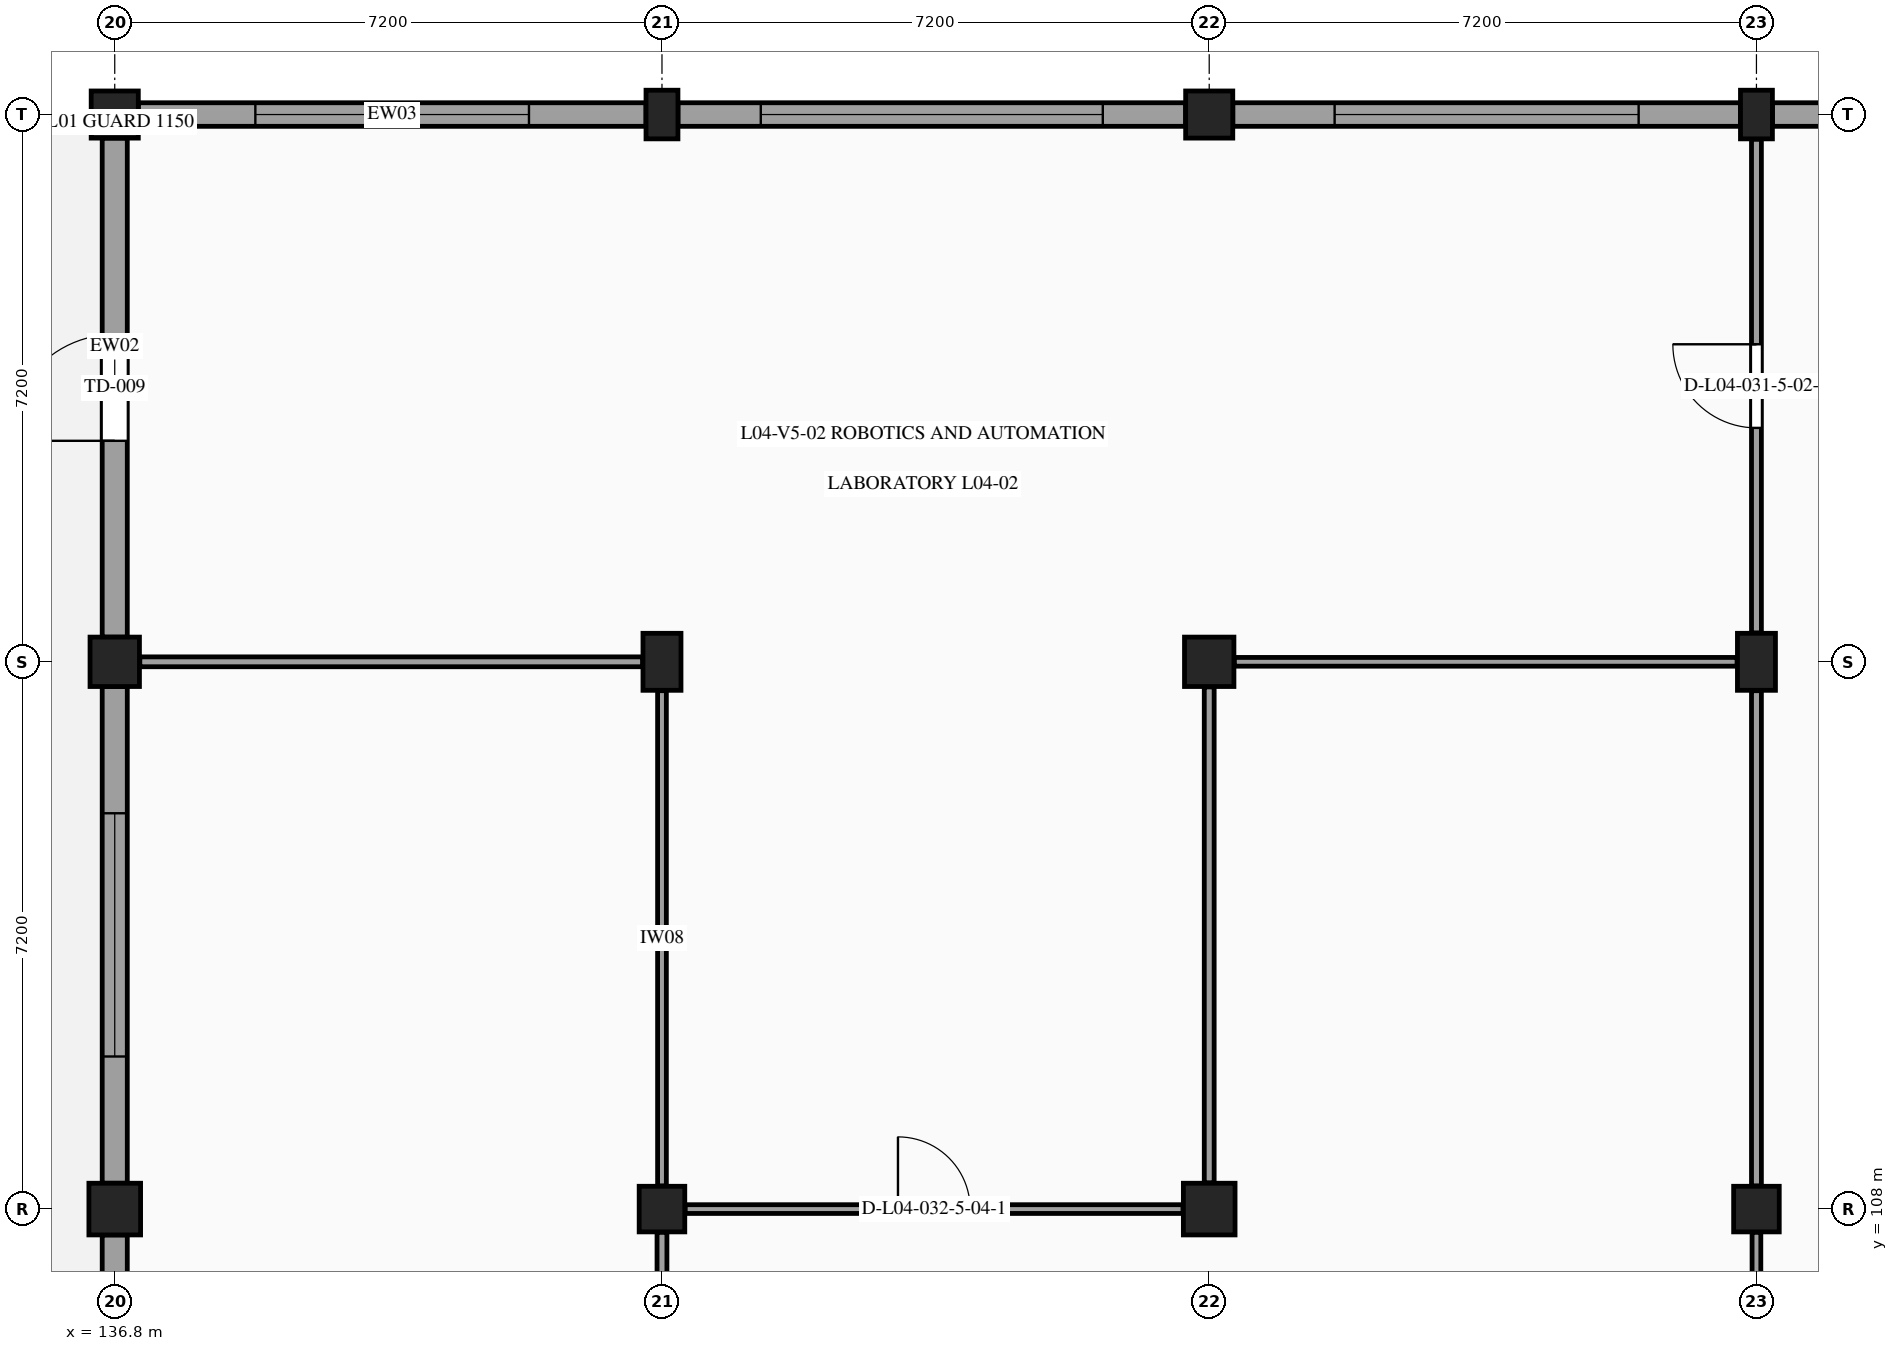
"""IFC4 building model, lengths in metres.
Left out: names, types, materials, properties, quantities, classifications, styles, units other than length and angle.
Written with IfcOpenShell. Run it as: python <this file> out.ifc"""

import sys

from ifc_helpers import new_model, si_unit, direction, frame, frame_2d, origin, origin_2d, place, context, subcontext, project, spatial, rectangle, extrude, element, fill, save


model = new_model("IFC4")
c1 = context("Model", 3, precision=1e-05, world=origin(), true_north=direction((0.0, 1.0)))
c2 = subcontext(c1, "Body", "Model", "MODEL_VIEW")
j1 = project(units=[si_unit("LENGTHUNIT", "METRE"), si_unit("PLANEANGLEUNIT", "RADIAN")], contexts=[c1])
p1 = place(None, origin())
s1 = spatial("IfcSite", under=j1, at=p1, CompositionType="ELEMENT")
p2 = place(p1, origin())
s2 = spatial("IfcBuilding", under=s1, at=p2, CompositionType="ELEMENT")
p3 = place(p2, frame((0.0, 0.0, 18.6)))
s3 = spatial("IfcBuildingStorey", under=s2, at=p3, CompositionType="ELEMENT", Elevation=18.6)
p4 = place(p3, frame((136.8, 108.0, 0.0), z_axis=(0.0, 0.0, 1.0), x_axis=(1.0, 0.0, 0.0)))
e1 = element("IfcColumn", 1, at=p4, inside=s3, PredefinedType="COLUMN", context=c2, shape_type="SweptSolid", body=[
    extrude(rectangle(XDim=0.68, YDim=0.68, at=origin_2d()), origin(), (0.0, 0.0, 1.0), 4.2),
])
p5 = place(p3, frame((136.8, 115.2, 0.0), z_axis=(0.0, 0.0, 1.0), x_axis=(1.0, 0.0, 0.0)))
e2 = element("IfcColumn", 2, at=p5, inside=s3, PredefinedType="COLUMN", context=c2, shape_type="SweptSolid", body=[
    extrude(rectangle(XDim=0.65, YDim=0.65, at=origin_2d()), origin(), (0.0, 0.0, 1.0), 4.2),
])
p6 = place(p3, frame((136.8, 122.4, 0.0), z_axis=(0.0, 0.0, 1.0), x_axis=(1.0, 0.0, 0.0)))
e3 = element("IfcColumn", 3, at=p6, inside=s3, PredefinedType="COLUMN", context=c2, shape_type="SweptSolid", body=[
    extrude(rectangle(XDim=0.62, YDim=0.62, at=origin_2d()), origin(), (0.0, 0.0, 1.0), 4.2),
])
p7 = place(p3, frame((144.0, 108.0, 0.0), z_axis=(0.0, 0.0, 1.0), x_axis=(1.0, 0.0, 0.0)))
e4 = element("IfcColumn", 4, at=p7, inside=s3, PredefinedType="COLUMN", context=c2, shape_type="SweptSolid", body=[
    extrude(rectangle(XDim=0.6, YDim=0.6, at=origin_2d()), origin(), (0.0, 0.0, 1.0), 4.2),
])
p8 = place(p3, frame((144.0, 115.2, 0.0), z_axis=(0.0, 0.0, 1.0), x_axis=(1.0, 0.0, 0.0)))
e5 = element("IfcColumn", 5, at=p8, inside=s3, PredefinedType="COLUMN", context=c2, shape_type="SweptSolid", body=[
    extrude(rectangle(XDim=0.5, YDim=0.75, at=origin_2d()), origin(), (0.0, 0.0, 1.0), 4.2),
])
p9 = place(p3, frame((144.0, 122.4, 0.0), z_axis=(0.0, 0.0, 1.0), x_axis=(1.0, 0.0, 0.0)))
e6 = element("IfcColumn", 6, at=p9, inside=s3, PredefinedType="PILASTER", context=c2, shape_type="SweptSolid", body=[
    extrude(rectangle(XDim=0.42, YDim=0.64, at=origin_2d()), origin(), (0.0, 0.0, 1.0), 4.2),
])
p10 = place(p3, frame((151.2, 108.0, 0.0), z_axis=(0.0, 0.0, 1.0), x_axis=(1.0, 0.0, 0.0)))
e7 = element("IfcColumn", 7, at=p10, inside=s3, PredefinedType="COLUMN", context=c2, shape_type="SweptSolid", body=[
    extrude(rectangle(XDim=0.68, YDim=0.68, at=origin_2d()), origin(), (0.0, 0.0, 1.0), 4.2),
])
p11 = place(p3, frame((151.2, 115.2, 0.0), z_axis=(0.0, 0.0, 1.0), x_axis=(1.0, 0.0, 0.0)))
e8 = element("IfcColumn", 8, at=p11, inside=s3, PredefinedType="COLUMN", context=c2, shape_type="SweptSolid", body=[
    extrude(rectangle(XDim=0.65, YDim=0.65, at=origin_2d()), origin(), (0.0, 0.0, 1.0), 4.2),
])
p12 = place(p3, frame((151.2, 122.4, 0.0), z_axis=(0.0, 0.0, 1.0), x_axis=(1.0, 0.0, 0.0)))
e9 = element("IfcColumn", 9, at=p12, inside=s3, PredefinedType="COLUMN", context=c2, shape_type="SweptSolid", body=[
    extrude(rectangle(XDim=0.62, YDim=0.62, at=origin_2d()), origin(), (0.0, 0.0, 1.0), 4.2),
])
p13 = place(p3, frame((158.4, 108.0, 0.0), z_axis=(0.0, 0.0, 1.0), x_axis=(1.0, 0.0, 0.0)))
e10 = element("IfcColumn", 10, at=p13, inside=s3, PredefinedType="COLUMN", context=c2, shape_type="SweptSolid", body=[
    extrude(rectangle(XDim=0.6, YDim=0.6, at=origin_2d()), origin(), (0.0, 0.0, 1.0), 4.2),
])
p14 = place(p3, frame((158.4, 115.2, 0.0), z_axis=(0.0, 0.0, 1.0), x_axis=(1.0, 0.0, 0.0)))
e11 = element("IfcColumn", 11, at=p14, inside=s3, PredefinedType="COLUMN", context=c2, shape_type="SweptSolid", body=[
    extrude(rectangle(XDim=0.5, YDim=0.75, at=origin_2d()), origin(), (0.0, 0.0, 1.0), 4.2),
])
p15 = place(p3, frame((158.4, 122.4, 0.0), z_axis=(0.0, 0.0, 1.0), x_axis=(1.0, 0.0, 0.0)))
e12 = element("IfcColumn", 12, at=p15, inside=s3, PredefinedType="PILASTER", context=c2, shape_type="SweptSolid", body=[
    extrude(rectangle(XDim=0.42, YDim=0.64, at=origin_2d()), origin(), (0.0, 0.0, 1.0), 4.2),
])
p16 = place(p3, frame((136.8, 115.525, 0.0), z_axis=(0.0, 0.0, 1.0), x_axis=(0.0, 1.0, 0.0)))
e13 = element("IfcWall", 13, at=p16, inside=s3, PredefinedType="STANDARD", context=c2, shape_type="SweptSolid", body=[
    extrude(rectangle(XDim=6.565, YDim=0.33, at=frame_2d((3.283, 0.0))), origin(), (0.0, 0.0, 1.0), 3.16),
])
p17 = place(p16, frame((2.583, 0.0, 0.0)))
e14 = element("IfcOpeningElement", 14, at=p17, cuts=e13, PredefinedType="OPENING", context=c2, shape_type="SweptSolid", body=[
    extrude(rectangle(XDim=1.4, YDim=2.25, at=frame_2d((0.7, 1.125))), frame((0.0, 0.175, 0.0), z_axis=(0.0, -1.0, 0.0), x_axis=(1.0, 0.0, 0.0)), (0.0, 0.0, 1.0), 0.35),
])
p18 = place(p3, frame((137.11, 122.4, 0.0), z_axis=(0.0, 0.0, 1.0), x_axis=(1.0, 0.0, 0.0)))
e15 = element("IfcWall", 15, at=p18, inside=s3, PredefinedType="STANDARD", context=c2, shape_type="SweptSolid", body=[
    extrude(rectangle(XDim=6.68, YDim=0.31, at=frame_2d((3.34, 0.0))), origin(), (0.0, 0.0, 1.0), 3.21),
])
p19 = place(p18, frame((1.54, 0.0, 0.98)))
e16 = element("IfcOpeningElement", 16, at=p19, cuts=e15, PredefinedType="OPENING", context=c2, shape_type="SweptSolid", body=[
    extrude(rectangle(XDim=3.6, YDim=1.8, at=frame_2d((1.8, 0.9))), frame((0.0, 0.165, 0.0), z_axis=(0.0, -1.0, 0.0), x_axis=(1.0, 0.0, 0.0)), (0.0, 0.0, 1.0), 0.33),
])
p20 = place(p3, frame((144.21, 122.4, 0.0), z_axis=(0.0, 0.0, 1.0), x_axis=(1.0, 0.0, 0.0)))
e17 = element("IfcWall", 17, at=p20, inside=s3, PredefinedType="STANDARD", context=c2, shape_type="SweptSolid", body=[
    extrude(rectangle(XDim=6.68, YDim=0.31, at=frame_2d((3.34, 0.0))), origin(), (0.0, 0.0, 1.0), 3.21),
])
p21 = place(p20, frame((1.09, 0.0, 0.98)))
e18 = element("IfcOpeningElement", 18, at=p21, cuts=e17, PredefinedType="OPENING", context=c2, shape_type="SweptSolid", body=[
    extrude(rectangle(XDim=4.5, YDim=1.55, at=frame_2d((2.25, 0.775))), frame((0.0, 0.165, 0.0), z_axis=(0.0, -1.0, 0.0), x_axis=(1.0, 0.0, 0.0)), (0.0, 0.0, 1.0), 0.33),
])
p22 = place(p3, frame((151.51, 122.4, 0.0), z_axis=(0.0, 0.0, 1.0), x_axis=(1.0, 0.0, 0.0)))
e19 = element("IfcWall", 19, at=p22, inside=s3, PredefinedType="STANDARD", context=c2, shape_type="SweptSolid", body=[
    extrude(rectangle(XDim=6.68, YDim=0.31, at=frame_2d((3.34, 0.0))), origin(), (0.0, 0.0, 1.0), 3.21),
])
p23 = place(p22, frame((1.34, 0.0, 0.98)))
e20 = element("IfcOpeningElement", 20, at=p23, cuts=e19, PredefinedType="OPENING", context=c2, shape_type="SweptSolid", body=[
    extrude(rectangle(XDim=4.0, YDim=1.55, at=frame_2d((2.0, 0.775))), frame((0.0, 0.165, 0.0), z_axis=(0.0, -1.0, 0.0), x_axis=(1.0, 0.0, 0.0)), (0.0, 0.0, 1.0), 0.33),
])
p24 = place(p3, frame((158.61, 122.4, 0.0), z_axis=(0.0, 0.0, 1.0), x_axis=(1.0, 0.0, 0.0)))
e21 = element("IfcWall", 21, at=p24, inside=s3, PredefinedType="STANDARD", context=c2, shape_type="SweptSolid", body=[
    extrude(rectangle(XDim=6.68, YDim=0.31, at=frame_2d((3.34, 0.0))), origin(), (0.0, 0.0, 1.0), 3.21),
])
p25 = place(p24, frame((1.64, 0.0, 0.98)))
e22 = element("IfcOpeningElement", 22, at=p25, cuts=e21, PredefinedType="OPENING", context=c2, shape_type="SweptSolid", body=[
    extrude(rectangle(XDim=3.4, YDim=1.55, at=frame_2d((1.7, 0.775))), frame((0.0, 0.165, 0.0), z_axis=(0.0, -1.0, 0.0), x_axis=(1.0, 0.0, 0.0)), (0.0, 0.0, 1.0), 0.33),
])
p26 = place(p3, frame((136.8, 101.12, 0.0), z_axis=(0.0, 0.0, 1.0), x_axis=(0.0, 1.0, 0.0)))
e23 = element("IfcWall", 23, at=p26, inside=s3, PredefinedType="STANDARD", context=c2, shape_type="SweptSolid", body=[
    extrude(rectangle(XDim=6.54, YDim=0.33, at=frame_2d((3.27, 0.0))), origin(), (0.0, 0.0, 1.0), 3.16),
])
p27 = place(p26, frame((1.67, 0.0, 0.95)))
e24 = element("IfcOpeningElement", 24, at=p27, cuts=e23, PredefinedType="OPENING", context=c2, shape_type="SweptSolid", body=[
    extrude(rectangle(XDim=3.2, YDim=1.45, at=frame_2d((1.6, 0.725))), frame((0.0, 0.175, 0.0), z_axis=(0.0, -1.0, 0.0), x_axis=(1.0, 0.0, 0.0)), (0.0, 0.0, 1.0), 0.35),
])
p28 = place(p3, frame((136.8, 108.34, 0.0), z_axis=(0.0, 0.0, 1.0), x_axis=(0.0, 1.0, 0.0)))
e25 = element("IfcWall", 25, at=p28, inside=s3, PredefinedType="STANDARD", context=c2, shape_type="SweptSolid", body=[
    extrude(rectangle(XDim=6.535, YDim=0.33, at=frame_2d((3.268, 0.0))), origin(), (0.0, 0.0, 1.0), 3.16),
])
p29 = place(p28, frame((1.667, 0.0, 0.95)))
e26 = element("IfcOpeningElement", 26, at=p29, cuts=e25, PredefinedType="OPENING", context=c2, shape_type="SweptSolid", body=[
    extrude(rectangle(XDim=3.2, YDim=1.45, at=frame_2d((1.6, 0.725))), frame((0.0, 0.175, 0.0), z_axis=(0.0, -1.0, 0.0), x_axis=(1.0, 0.0, 0.0)), (0.0, 0.0, 1.0), 0.35),
])
p30 = place(p3, frame((144.0, 101.115, 0.0), z_axis=(0.0, 0.0, 1.0), x_axis=(0.0, 1.0, 0.0)))
e27 = element("IfcWall", 27, at=p30, inside=s3, PredefinedType="PARTITIONING", context=c2, shape_type="SweptSolid", body=[
    extrude(rectangle(XDim=6.58, YDim=0.13, at=frame_2d((3.29, 0.0))), origin(), (0.0, 0.0, 1.0), 3.27),
])
p31 = place(p30, frame((2.33, 0.0, 0.0)))
e28 = element("IfcOpeningElement", 28, at=p31, cuts=e27, PredefinedType="OPENING", context=c2, shape_type="SweptSolid", body=[
    extrude(rectangle(XDim=1.92, YDim=2.35, at=frame_2d((0.96, 1.175))), frame((0.0, 0.075, 0.0), z_axis=(0.0, -1.0, 0.0), x_axis=(1.0, 0.0, 0.0)), (0.0, 0.0, 1.0), 0.15),
])
p32 = place(p3, frame((144.0, 108.305, 0.0), z_axis=(0.0, 0.0, 1.0), x_axis=(0.0, 1.0, 0.0)))
e29 = element("IfcWall", 29, at=p32, inside=s3, PredefinedType="PARTITIONING", context=c2, shape_type="SweptSolid", body=[
    extrude(rectangle(XDim=6.515, YDim=0.115, at=frame_2d((3.258, 0.0))), origin(), (0.0, 0.0, 1.0), 3.27),
])
p33 = place(p3, frame((137.13, 115.2, 0.0), z_axis=(0.0, 0.0, 1.0), x_axis=(1.0, 0.0, 0.0)))
e30 = element("IfcWall", 30, at=p33, inside=s3, PredefinedType="PARTITIONING", context=c2, shape_type="SweptSolid", body=[
    extrude(rectangle(XDim=6.615, YDim=0.13, at=frame_2d((3.308, 0.0))), origin(), (0.0, 0.0, 1.0), 3.24),
])
p34 = place(p3, frame((144.305, 108.0, 0.0), z_axis=(0.0, 0.0, 1.0), x_axis=(1.0, 0.0, 0.0)))
e31 = element("IfcWall", 31, at=p34, inside=s3, PredefinedType="PARTITIONING", context=c2, shape_type="SweptSolid", body=[
    extrude(rectangle(XDim=6.55, YDim=0.115, at=frame_2d((3.275, 0.0))), origin(), (0.0, 0.0, 1.0), 3.245),
])
p35 = place(p34, frame((2.8, 0.0, 0.0)))
e32 = element("IfcOpeningElement", 32, at=p35, cuts=e31, PredefinedType="OPENING", context=c2, shape_type="SweptSolid", body=[
    extrude(rectangle(XDim=0.95, YDim=2.15, at=frame_2d((0.475, 1.075))), frame((0.0, 0.067, 0.0), z_axis=(0.0, -1.0, 0.0), x_axis=(1.0, 0.0, 0.0)), (0.0, 0.0, 1.0), 0.135),
])
p36 = place(p3, frame((151.2, 108.345, 0.0), z_axis=(0.0, 0.0, 1.0), x_axis=(0.0, 1.0, 0.0)))
e33 = element("IfcWall", 33, at=p36, inside=s3, PredefinedType="PARTITIONING", context=c2, shape_type="SweptSolid", body=[
    extrude(rectangle(XDim=6.525, YDim=0.13, at=frame_2d((3.263, 0.0))), origin(), (0.0, 0.0, 1.0), 3.27),
])
p37 = place(p3, frame((158.4, 101.115, 0.0), z_axis=(0.0, 0.0, 1.0), x_axis=(0.0, 1.0, 0.0)))
e34 = element("IfcWall", 34, at=p37, inside=s3, PredefinedType="PARTITIONING", context=c2, shape_type="SweptSolid", body=[
    extrude(rectangle(XDim=6.58, YDim=0.115, at=frame_2d((3.29, 0.0))), origin(), (0.0, 0.0, 1.0), 3.27),
])
p38 = place(p3, frame((158.4, 108.305, 0.0), z_axis=(0.0, 0.0, 1.0), x_axis=(0.0, 1.0, 0.0)))
e35 = element("IfcWall", 35, at=p38, inside=s3, PredefinedType="PARTITIONING", context=c2, shape_type="SweptSolid", body=[
    extrude(rectangle(XDim=6.515, YDim=0.13, at=frame_2d((3.258, 0.0))), origin(), (0.0, 0.0, 1.0), 3.27),
])
p39 = place(p3, frame((151.53, 115.2, 0.0), z_axis=(0.0, 0.0, 1.0), x_axis=(1.0, 0.0, 0.0)))
e36 = element("IfcWall", 36, at=p39, inside=s3, PredefinedType="PARTITIONING", context=c2, shape_type="SweptSolid", body=[
    extrude(rectangle(XDim=6.615, YDim=0.115, at=frame_2d((3.308, 0.0))), origin(), (0.0, 0.0, 1.0), 3.265),
])
p40 = place(p3, frame((158.4, 115.58, 0.0), z_axis=(0.0, 0.0, 1.0), x_axis=(0.0, 1.0, 0.0)))
e37 = element("IfcWall", 37, at=p40, inside=s3, PredefinedType="PARTITIONING", context=c2, shape_type="SweptSolid", body=[
    extrude(rectangle(XDim=6.495, YDim=0.13, at=frame_2d((3.248, 0.0))), origin(), (0.0, 0.0, 1.0), 3.335),
])
p41 = place(p40, frame((2.698, 0.0, 0.0)))
e38 = element("IfcOpeningElement", 38, at=p41, cuts=e37, PredefinedType="OPENING", context=c2, shape_type="SweptSolid", body=[
    extrude(rectangle(XDim=1.1, YDim=2.15, at=frame_2d((0.55, 1.075))), frame((0.0, 0.075, 0.0), z_axis=(0.0, -1.0, 0.0), x_axis=(1.0, 0.0, 0.0)), (0.0, 0.0, 1.0), 0.15),
])
p42 = place(p17, origin())
e39 = element("IfcDoor", 39, at=p42, inside=s3, OperationType="SINGLE_SWING_LEFT", PredefinedType="DOOR", context=c2, shape_type="SweptSolid", body=[
    extrude(rectangle(XDim=1.4, YDim=2.25, at=frame_2d((0.7, 1.125))), frame((0.0, 0.025, 0.0), z_axis=(0.0, -1.0, 0.0), x_axis=(1.0, 0.0, 0.0)), (0.0, 0.0, 1.0), 0.05),
])
fill(e14, e39)
p43 = place(p19, origin())
e40 = element("IfcWindow", 40, at=p43, inside=s3, PartitioningType="SINGLE_PANEL", PredefinedType="WINDOW", context=c2, shape_type="SweptSolid", body=[
    extrude(rectangle(XDim=3.6, YDim=1.8, at=frame_2d((1.8, 0.9))), frame((0.0, -0.03, 0.0), z_axis=(0.0, -1.0, 0.0), x_axis=(1.0, 0.0, 0.0)), (0.0, 0.0, 1.0), 0.06),
])
fill(e16, e40)
p44 = place(p21, origin())
e41 = element("IfcWindow", 41, at=p44, inside=s3, PartitioningType="SINGLE_PANEL", PredefinedType="WINDOW", context=c2, shape_type="SweptSolid", body=[
    extrude(rectangle(XDim=4.5, YDim=1.55, at=frame_2d((2.25, 0.775))), frame((0.0, -0.03, 0.0), z_axis=(0.0, -1.0, 0.0), x_axis=(1.0, 0.0, 0.0)), (0.0, 0.0, 1.0), 0.06),
])
fill(e18, e41)
p45 = place(p23, origin())
e42 = element("IfcWindow", 42, at=p45, inside=s3, PartitioningType="SINGLE_PANEL", PredefinedType="WINDOW", context=c2, shape_type="SweptSolid", body=[
    extrude(rectangle(XDim=4.0, YDim=1.55, at=frame_2d((2.0, 0.775))), frame((0.0, -0.03, 0.0), z_axis=(0.0, -1.0, 0.0), x_axis=(1.0, 0.0, 0.0)), (0.0, 0.0, 1.0), 0.06),
])
fill(e20, e42)
p46 = place(p29, origin())
e43 = element("IfcWindow", 43, at=p46, inside=s3, PartitioningType="SINGLE_PANEL", PredefinedType="WINDOW", context=c2, shape_type="SweptSolid", body=[
    extrude(rectangle(XDim=3.2, YDim=1.45, at=frame_2d((1.6, 0.725))), frame((0.0, 0.03, 0.0), z_axis=(0.0, -1.0, 0.0), x_axis=(1.0, 0.0, 0.0)), (0.0, 0.0, 1.0), 0.06),
])
fill(e26, e43)
p47 = place(p41, origin())
e44 = element("IfcDoor", 44, at=p47, inside=s3, OperationType="SINGLE_SWING_RIGHT", PredefinedType="DOOR", context=c2, shape_type="SweptSolid", body=[
    extrude(rectangle(XDim=1.1, YDim=2.15, at=frame_2d((0.55, 1.075))), frame((0.0, 0.025, 0.0), z_axis=(0.0, -1.0, 0.0), x_axis=(1.0, 0.0, 0.0)), (0.0, 0.0, 1.0), 0.05),
])
fill(e38, e44)
p48 = place(p35, origin())
e45 = element("IfcDoor", 45, at=p48, inside=s3, OperationType="SINGLE_SWING_LEFT", PredefinedType="DOOR", context=c2, shape_type="SweptSolid", body=[
    extrude(rectangle(XDim=0.95, YDim=2.15, at=frame_2d((0.475, 1.075))), frame((0.0, 0.025, 0.0), z_axis=(0.0, -1.0, 0.0), x_axis=(1.0, 0.0, 0.0)), (0.0, 0.0, 1.0), 0.05),
])
fill(e32, e45)
save(model, sys.argv[1])
